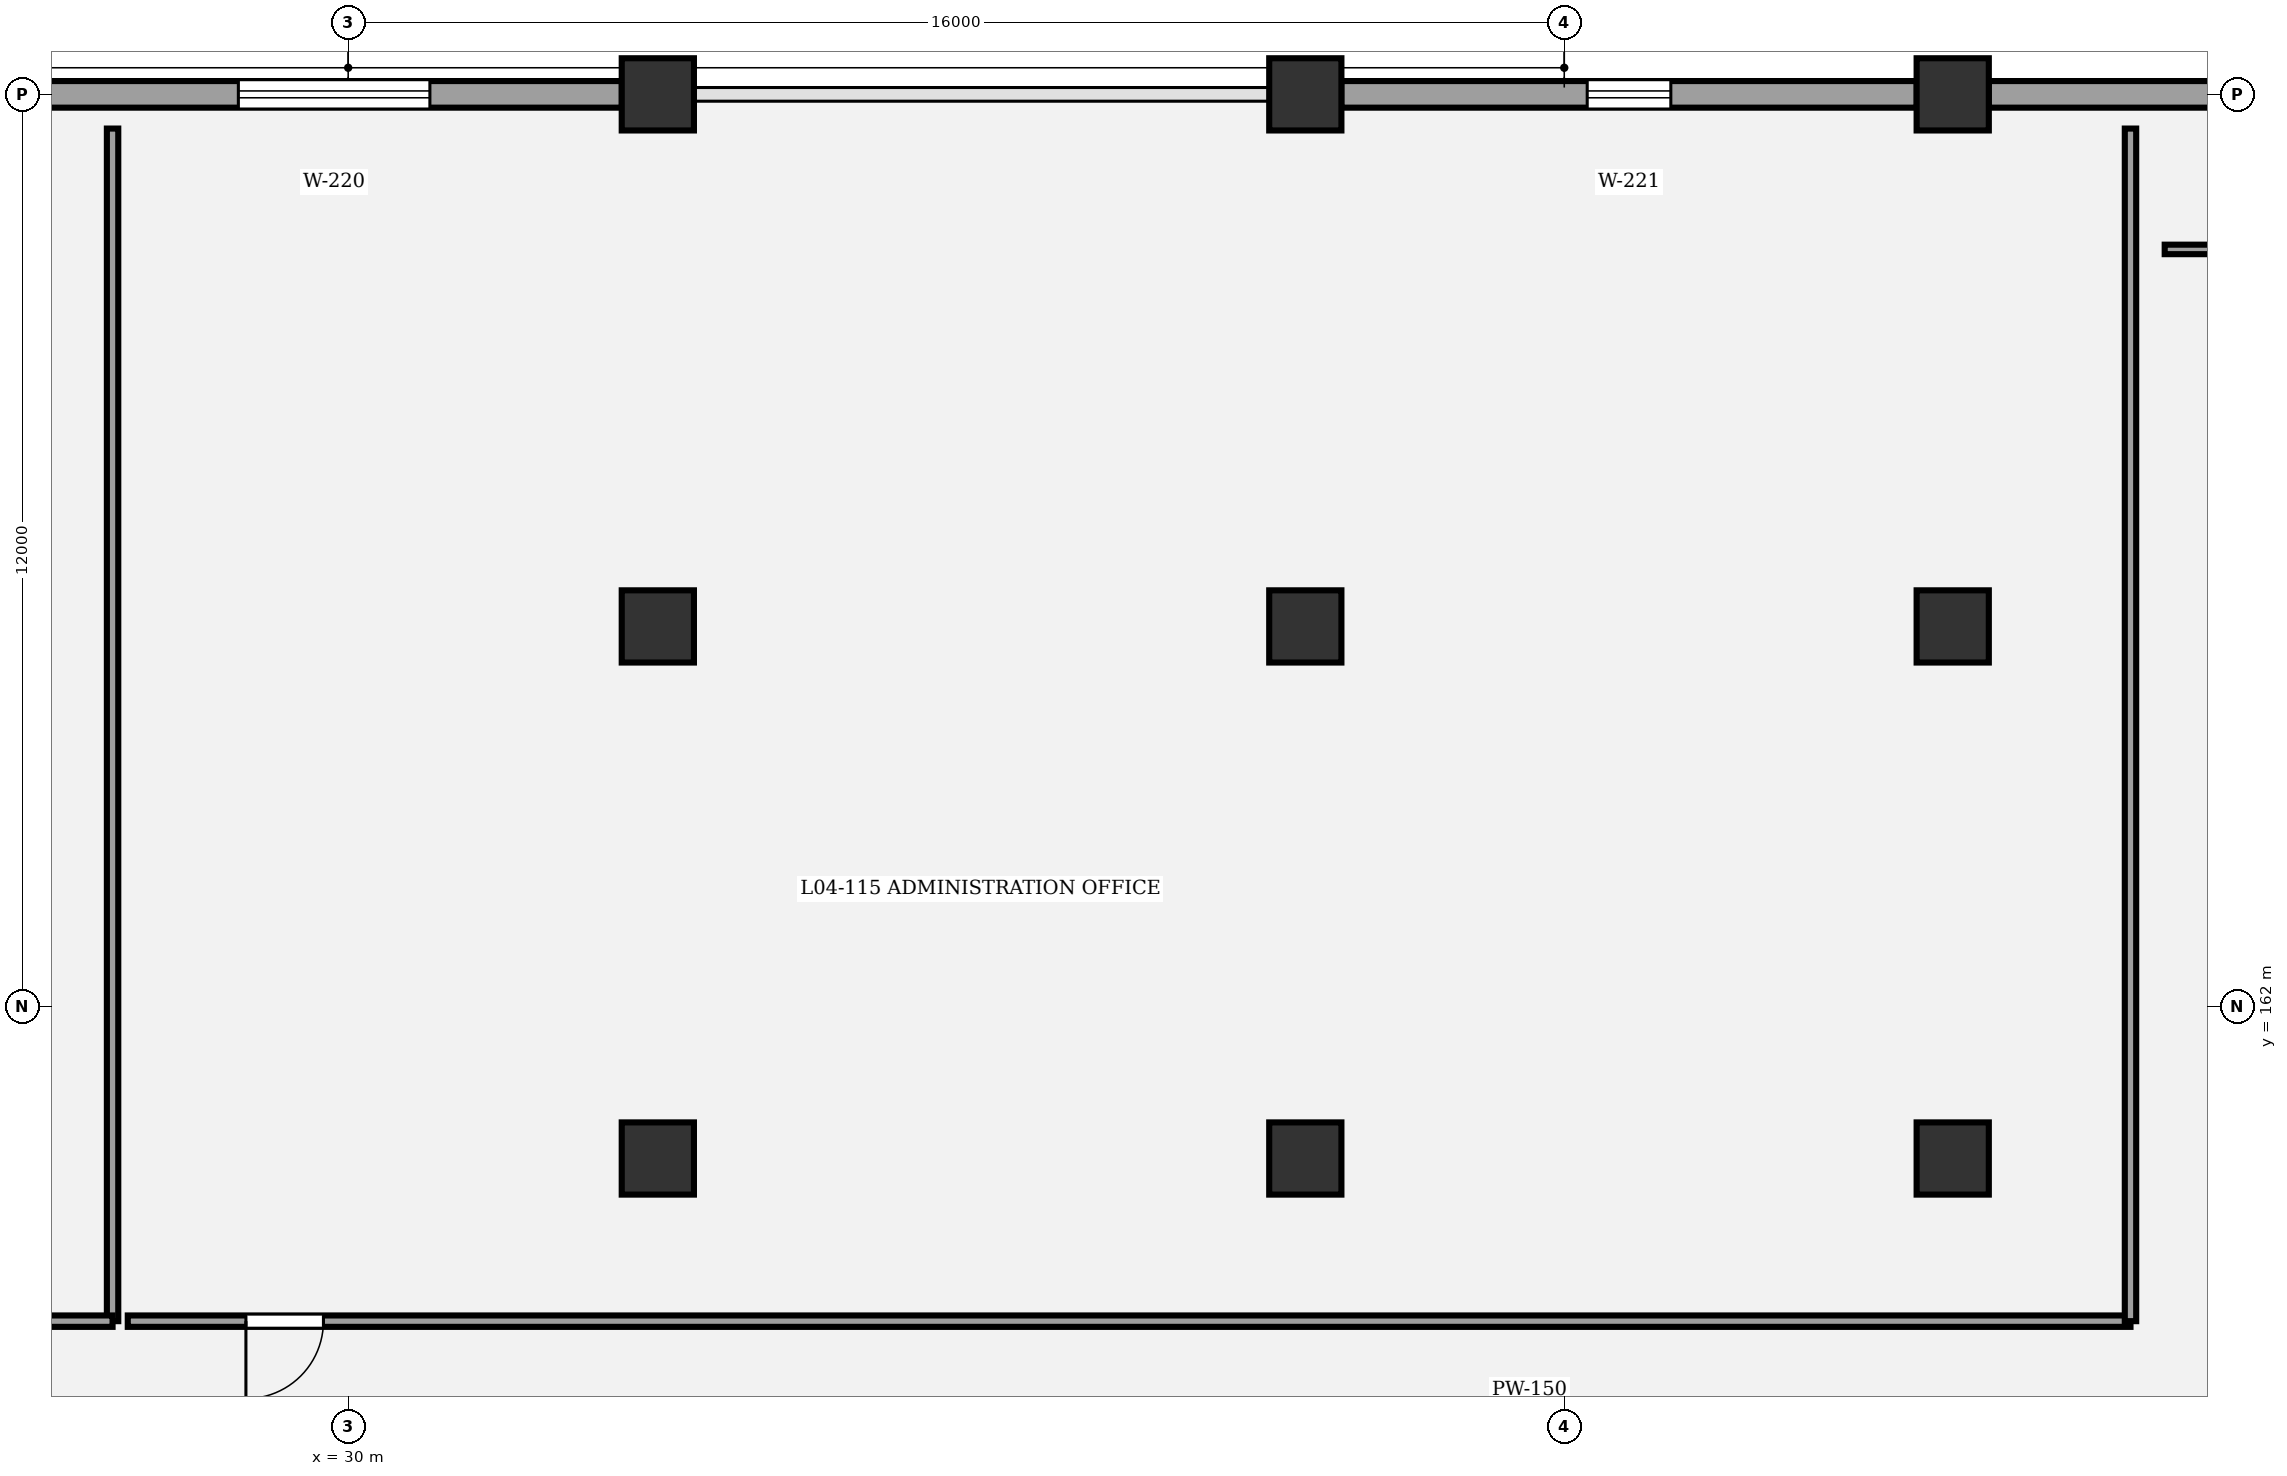
"""IFC4 building model, lengths in metres.
Left out: names, types, materials, properties, quantities, classifications, styles, units other than length and angle.
Written with IfcOpenShell. Run it as: python <this file> out.ifc"""

import sys

from ifc_helpers import new_model, si_unit, direction, frame, frame_2d, origin, origin_2d, place, context, subcontext, project, spatial, rectangle, circle, extrude, element, fill, save


model = new_model("IFC4")
c1 = context("Model", 3, precision=1e-05, world=origin(), true_north=direction((0.0, 1.0)))
c2 = subcontext(c1, "Body", "Model", "MODEL_VIEW")
j1 = project(units=[si_unit("LENGTHUNIT", "METRE"), si_unit("PLANEANGLEUNIT", "RADIAN")], contexts=[c1])
p1 = place(None, origin())
s1 = spatial("IfcSite", under=j1, at=p1, CompositionType="ELEMENT")
p2 = place(p1, origin())
s2 = spatial("IfcBuilding", under=s1, at=p2, CompositionType="ELEMENT")
p3 = place(p2, frame((0.0, 0.0, 19.2)))
s3 = spatial("IfcBuildingStorey", under=s2, at=p3, CompositionType="ELEMENT", Elevation=19.2)
for number, where, z_axis, x_axis in (
    (1, (34.074, 160.0, 0.0), (0.0, 0.0, 1.0), (1.0, 0.0, 0.0)),
    (2, (34.074, 167.0, 0.0), (0.0, 0.0, 1.0), (1.0, 0.0, 0.0)),
    (3, (34.074, 174.0, 0.0), (0.0, 0.0, 1.0), (1.0, 0.0, 0.0)),
    (4, (42.593, 160.0, 0.0), (0.0, 0.0, 1.0), (1.0, 0.0, 0.0)),
    (5, (42.593, 167.0, 0.0), (0.0, 0.0, 1.0), (1.0, 0.0, 0.0)),
    (6, (42.593, 174.0, 0.0), (0.0, 0.0, 1.0), (1.0, 0.0, 0.0)),
    (7, (51.111, 160.0, 0.0), (0.0, 0.0, 1.0), (1.0, 0.0, 0.0)),
    (8, (51.111, 167.0, 0.0), (0.0, 0.0, 1.0), (1.0, 0.0, 0.0)),
    (9, (51.111, 174.0, 0.0), (0.0, 0.0, 1.0), (1.0, 0.0, 0.0)),
):
    element("IfcColumn", number, at=place(p3, frame(where, z_axis=z_axis, x_axis=x_axis)), inside=s3, PredefinedType="COLUMN", context=c2, shape_type="SweptSolid", body=[
        extrude(circle(Radius=0.475, at=origin_2d()), origin(), (0.0, 0.0, 1.0), 4.8),
    ])
p4 = place(p3, frame((26.029, 174.0, 0.0), z_axis=(0.0, 0.0, 1.0), x_axis=(1.0, 0.0, 0.0)))
e10 = element("IfcWall", 10, at=p4, inside=s3, PredefinedType="STANDARD", context=c2, shape_type="SweptSolid", body=[
    extrude(rectangle(XDim=7.572, YDim=0.35, at=frame_2d((3.786, 0.0))), origin(), (0.0, 0.0, 1.0), 3.56),
])
p5 = place(p4, frame((2.526, 0.0, 0.9)))
e11 = element("IfcOpeningElement", 11, at=p5, cuts=e10, PredefinedType="OPENING", context=c2, shape_type="SweptSolid", body=[
    extrude(rectangle(XDim=2.52, YDim=2.15, at=frame_2d((1.26, 1.075))), frame((0.0, 0.185, 0.0), z_axis=(0.0, -1.0, 0.0), x_axis=(1.0, 0.0, 0.0)), (0.0, 0.0, 1.0), 0.37),
])
p6 = place(p3, frame((43.066, 174.0, 0.0), z_axis=(0.0, 0.0, 1.0), x_axis=(1.0, 0.0, 0.0)))
e12 = element("IfcWall", 12, at=p6, inside=s3, PredefinedType="STANDARD", context=c2, shape_type="SweptSolid", body=[
    extrude(rectangle(XDim=7.572, YDim=0.35, at=frame_2d((3.786, 0.0))), origin(), (0.0, 0.0, 1.0), 3.56),
])
p7 = place(p6, frame((3.236, 0.0, 0.9)))
e13 = element("IfcOpeningElement", 13, at=p7, cuts=e12, PredefinedType="OPENING", context=c2, shape_type="SweptSolid", body=[
    extrude(rectangle(XDim=1.1, YDim=1.55, at=frame_2d((0.55, 0.775))), frame((0.0, 0.185, 0.0), z_axis=(0.0, -1.0, 0.0), x_axis=(1.0, 0.0, 0.0)), (0.0, 0.0, 1.0), 0.37),
])
p8 = place(p3, frame((51.584, 174.0, 0.0), z_axis=(0.0, 0.0, 1.0), x_axis=(1.0, 0.0, 0.0)))
e14 = element("IfcWall", 14, at=p8, inside=s3, PredefinedType="STANDARD", context=c2, shape_type="SweptSolid", body=[
    extrude(rectangle(XDim=7.573, YDim=0.35, at=frame_2d((3.787, 0.0))), origin(), (0.0, 0.0, 1.0), 3.56),
])
p9 = place(p8, frame((3.167, 0.0, 0.9)))
e15 = element("IfcOpeningElement", 15, at=p9, cuts=e14, PredefinedType="OPENING", context=c2, shape_type="SweptSolid", body=[
    extrude(rectangle(XDim=1.24, YDim=1.55, at=frame_2d((0.62, 0.775))), frame((0.0, 0.185, 0.0), z_axis=(0.0, -1.0, 0.0), x_axis=(1.0, 0.0, 0.0)), (0.0, 0.0, 1.0), 0.37),
])
p10 = place(p3, frame((53.45, 157.86, 0.0), z_axis=(0.0, 0.0, 1.0), x_axis=(-1.0, 0.0, 0.0)))
e16 = element("IfcWall", 16, at=p10, inside=s3, PredefinedType="PARTITIONING", context=c2, shape_type="SweptSolid", body=[
    extrude(rectangle(XDim=26.35, YDim=0.15, at=frame_2d((13.175, 0.0))), origin(), (0.0, 0.0, 1.0), 3.55),
])
p11 = place(p10, frame((23.775, 0.0, 0.0)))
e17 = element("IfcOpeningElement", 17, at=p11, cuts=e16, PredefinedType="OPENING", context=c2, shape_type="SweptSolid", body=[
    extrude(rectangle(XDim=1.02, YDim=2.2, at=frame_2d((0.51, 1.1))), frame((0.0, 0.085, 0.0), z_axis=(0.0, -1.0, 0.0), x_axis=(1.0, 0.0, 0.0)), (0.0, 0.0, 1.0), 0.17),
])
p12 = place(p3, frame((80.0, 171.96, 0.0), z_axis=(0.0, 0.0, 1.0), x_axis=(-1.0, 0.0, 0.0)))
e18 = element("IfcWall", 18, at=p12, inside=s3, PredefinedType="PARTITIONING", context=c2, shape_type="SweptSolid", body=[
    extrude(rectangle(XDim=26.1, YDim=0.125, at=frame_2d((13.05, 0.0))), origin(), (0.0, 0.0, 1.0), 3.55),
])
p13 = place(p12, frame((16.154, 0.0, 0.0)))
e19 = element("IfcOpeningElement", 19, at=p13, cuts=e18, PredefinedType="OPENING", context=c2, shape_type="SweptSolid", body=[
    extrude(rectangle(XDim=1.1, YDim=2.2, at=frame_2d((0.55, 1.1))), frame((0.0, 0.073, 0.0), z_axis=(0.0, -1.0, 0.0), x_axis=(1.0, 0.0, 0.0)), (0.0, 0.0, 1.0), 0.145),
])
p14 = place(p3, frame((26.9, 173.55, 0.0), z_axis=(0.0, 0.0, 1.0), x_axis=(0.0, -1.0, 0.0)))
e20 = element("IfcWall", 20, at=p14, inside=s3, PredefinedType="PARTITIONING", context=c2, shape_type="SweptSolid", body=[
    extrude(rectangle(XDim=15.69, YDim=0.15, at=frame_2d((7.845, 0.0))), origin(), (0.0, 0.0, 1.0), 3.55),
])
p15 = place(p3, frame((26.9, 157.86, 0.0), z_axis=(0.0, 0.0, 1.0), x_axis=(-1.0, 0.0, 0.0)))
e21 = element("IfcWall", 21, at=p15, inside=s3, PredefinedType="PARTITIONING", context=c2, shape_type="SweptSolid", body=[
    extrude(rectangle(XDim=13.4, YDim=0.15, at=frame_2d((6.7, 0.0))), origin(), (0.0, 0.0, 1.0), 3.55),
])
p16 = place(p3, frame((53.45, 173.55, 0.0), z_axis=(0.0, 0.0, 1.0), x_axis=(0.0, -1.0, 0.0)))
e22 = element("IfcWall", 22, at=p16, inside=s3, PredefinedType="PARTITIONING", context=c2, shape_type="SweptSolid", body=[
    extrude(rectangle(XDim=15.69, YDim=0.15, at=frame_2d((7.845, 0.0))), origin(), (0.0, 0.0, 1.0), 3.55),
])
p17 = place(p5, origin())
e23 = element("IfcWindow", 23, at=p17, inside=s3, PartitioningType="SINGLE_PANEL", PredefinedType="WINDOW", context=c2, shape_type="SweptSolid", body=[
    extrude(rectangle(XDim=2.52, YDim=2.15, at=frame_2d((1.26, 1.075))), frame((0.0, 0.03, 0.0), z_axis=(0.0, -1.0, 0.0), x_axis=(1.0, 0.0, 0.0)), (0.0, 0.0, 1.0), 0.06),
])
fill(e11, e23)
p18 = place(p7, origin())
e24 = element("IfcWindow", 24, at=p18, inside=s3, PartitioningType="SINGLE_PANEL", PredefinedType="WINDOW", context=c2, shape_type="SweptSolid", body=[
    extrude(rectangle(XDim=1.1, YDim=1.55, at=frame_2d((0.55, 0.775))), frame((0.0, 0.03, 0.0), z_axis=(0.0, -1.0, 0.0), x_axis=(1.0, 0.0, 0.0)), (0.0, 0.0, 1.0), 0.06),
])
fill(e13, e24)
p19 = place(p11, origin())
e25 = element("IfcDoor", 25, at=p19, inside=s3, OperationType="SINGLE_SWING_RIGHT", PredefinedType="DOOR", context=c2, shape_type="SweptSolid", body=[
    extrude(rectangle(XDim=1.02, YDim=2.2, at=frame_2d((0.51, 1.1))), frame((0.0, 0.025, 0.0), z_axis=(0.0, -1.0, 0.0), x_axis=(1.0, 0.0, 0.0)), (0.0, 0.0, 1.0), 0.05),
])
fill(e17, e25)
save(model, sys.argv[1])
